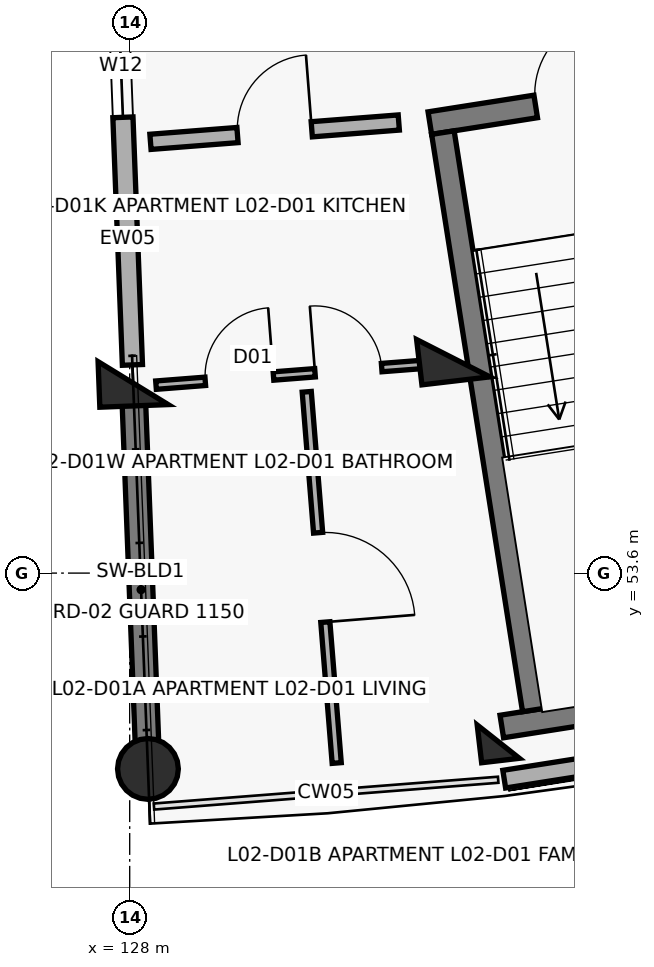
"""IFC4 building model, lengths in metres.
Left out: names, types, materials, properties, quantities, classifications, styles, units other than length and angle.
Written with IfcOpenShell. Run it as: python <this file> out.ifc"""

import sys

from ifc_helpers import new_model, si_unit, direction, frame, frame_2d, origin, origin_2d, place, context, subcontext, project, spatial, rectangle, circle, extrude, element, fill, save


model = new_model("IFC4")
c1 = context("Model", 3, precision=1e-05, world=origin(), true_north=direction((0.0, 1.0)))
c2 = subcontext(c1, "Body", "Model", "MODEL_VIEW")
j1 = project(units=[si_unit("LENGTHUNIT", "METRE"), si_unit("PLANEANGLEUNIT", "RADIAN")], contexts=[c1])
p1 = place(None, origin())
s1 = spatial("IfcSite", under=j1, at=p1, CompositionType="ELEMENT")
p2 = place(p1, origin())
s2 = spatial("IfcBuilding", under=s1, at=p2, CompositionType="ELEMENT")
p3 = place(p2, frame((0.0, 0.0, 8.1)))
s3 = spatial("IfcBuildingStorey", under=s2, at=p3, CompositionType="ELEMENT", Elevation=8.1)
p4 = place(p3, frame((128.045, 56.1, 0.0), z_axis=(0.0, 0.0, 1.0), x_axis=(0.038387809088, -0.999262916411, 0.0)))
e1 = element("IfcColumn", 1, at=p4, inside=s3, PredefinedType="COLUMN", context=c2, shape_type="SweptSolid", body=[
    extrude(rectangle(XDim=0.6, YDim=0.9, at=origin_2d()), origin(), (0.0, 0.0, 1.0), 3.1),
])
p5 = place(p3, frame((128.24, 51.023, 0.0), z_axis=(0.0, 0.0, 1.0), x_axis=(0.038387809088, -0.999262916411, 0.0)))
e2 = element("IfcColumn", 2, at=p5, inside=s3, PredefinedType="COLUMN", context=c2, shape_type="SweptSolid", body=[
    extrude(circle(Radius=0.4, at=origin_2d()), origin(), (0.0, 0.0, 1.0), 3.1),
])
p6 = place(p3, frame((132.257, 56.427, 0.0), z_axis=(0.0, 0.0, 1.0), x_axis=(0.116670737099, -0.993170649538, 0.0)))
e3 = element("IfcColumn", 3, at=p6, inside=s3, PredefinedType="COLUMN", context=c2, shape_type="SweptSolid", body=[
    extrude(rectangle(XDim=0.6, YDim=0.9, at=origin_2d()), origin(), (0.0, 0.0, 1.0), 3.1),
])
p7 = place(p3, frame((132.85, 51.382, 0.0), z_axis=(0.0, 0.0, 1.0), x_axis=(0.116670737099, -0.993170649538, 0.0)))
e4 = element("IfcColumn", 4, at=p7, inside=s3, PredefinedType="COLUMN", context=c2, shape_type="SweptSolid", body=[
    extrude(rectangle(XDim=0.5, YDim=0.5, at=origin_2d()), origin(), (0.0, 0.0, 1.0), 3.1),
])
p8 = place(p3, frame((128.052, 55.92, 0.0), z_axis=(0.0, 0.0, 1.0), x_axis=(0.038381471406, -0.99926315986, 0.0)))
e5 = element("IfcWall", 5, at=p8, inside=s3, PredefinedType="SHEAR", context=c2, shape_type="SweptSolid", body=[
    extrude(rectangle(XDim=4.72, YDim=0.31, at=frame_2d((2.36, 0.0))), origin(), (0.0, 0.0, 1.0), 2.86),
])
p9 = place(p3, frame((132.928, 50.889, 0.0), z_axis=(0.0, 0.0, 1.0), x_axis=(0.987828826394, 0.155544880165, 0.0)))
e6 = element("IfcWall", 6, at=p9, inside=s3, PredefinedType="SOLIDWALL", context=c2, shape_type="SweptSolid", body=[
    extrude(rectangle(XDim=4.622, YDim=0.235, at=frame_2d((2.311, 0.0))), origin(), (0.0, 0.0, 1.0), 2.25),
])
p10 = place(p3, frame((127.721, 64.533, 0.0), z_axis=(0.0, 0.0, 1.0), x_axis=(0.038407966241, -0.999262141847, 0.0)))
e7 = element("IfcWall", 7, at=p10, inside=s3, PredefinedType="SOLIDWALL", context=c2, shape_type="SweptSolid", body=[
    extrude(rectangle(XDim=8.2, YDim=0.265, at=frame_2d((4.1, 0.0))), origin(), (0.0, 0.0, 1.0), 2.08),
])
p11 = place(p10, frame((3.59, 0.0, 0.75)))
e8 = element("IfcOpeningElement", 8, at=p11, cuts=e7, PredefinedType="OPENING", context=c2, shape_type="SweptSolid", body=[
    extrude(rectangle(XDim=1.35, YDim=1.35, at=frame_2d((0.675, 0.675))), frame((0.0, 0.142, 0.0), z_axis=(0.0, -1.0, 0.0), x_axis=(1.0, 0.0, 0.0)), (0.0, 0.0, 1.0), 0.285),
])
p12 = place(p3, frame((131.949, 59.521, 0.0), z_axis=(0.0, 0.0, 1.0), x_axis=(0.98782579805, 0.155564111245, 0.0)))
e9 = element("IfcWall", 9, at=p12, inside=s3, PredefinedType="SHEAR", context=c2, shape_type="SweptSolid", body=[
    extrude(rectangle(XDim=3.87, YDim=0.3, at=frame_2d((1.935, 0.0))), origin(), (0.0, 0.0, 1.0), 3.1),
])
p13 = place(p12, frame((1.41, 0.0, 0.0)))
e10 = element("IfcOpeningElement", 10, at=p13, cuts=e9, PredefinedType="OPENING", context=c2, shape_type="SweptSolid", body=[
    extrude(rectangle(XDim=1.05, YDim=2.15, at=frame_2d((0.525, 1.075))), frame((0.0, 0.16, 0.0), z_axis=(0.0, -1.0, 0.0), x_axis=(1.0, 0.0, 0.0)), (0.0, 0.0, 1.0), 0.32),
])
p14 = place(p3, frame((132.896, 51.581, 0.0), z_axis=(0.0, 0.0, 1.0), x_axis=(0.987819142769, 0.155606366126, 0.0)))
e11 = element("IfcWall", 11, at=p14, inside=s3, PredefinedType="SHEAR", context=c2, shape_type="SweptSolid", body=[
    extrude(rectangle(XDim=4.47, YDim=0.3, at=frame_2d((2.235, 0.0))), origin(), (0.0, 0.0, 1.0), 3.1),
])
p15 = place(p3, frame((132.121, 59.396, 0.0), z_axis=(0.0, 0.0, 1.0), x_axis=(0.155563141844, -0.987825950712, 0.0)))
e12 = element("IfcWall", 12, at=p15, inside=s3, PredefinedType="SHEAR", context=c2, shape_type="SweptSolid", body=[
    extrude(rectangle(XDim=7.69, YDim=0.3, at=frame_2d((3.845, 0.0))), origin(), (0.0, 0.0, 1.0), 3.1),
])
p16 = place(p3, frame((128.273, 59.274, 0.0), z_axis=(0.0, 0.0, 1.0), x_axis=(0.996982624396, 0.077625038827, 0.0)))
e13 = element("IfcWall", 13, at=p16, inside=s3, PredefinedType="SOLIDWALL", context=c2, shape_type="SweptSolid", body=[
    extrude(rectangle(XDim=3.277, YDim=0.2, at=frame_2d((1.639, 0.0))), origin(), (0.0, 0.0, 1.0), 2.08),
])
p17 = place(p16, frame((1.148, 0.0, 0.0)))
e14 = element("IfcOpeningElement", 14, at=p17, cuts=e13, PredefinedType="OPENING", context=c2, shape_type="SweptSolid", body=[
    extrude(rectangle(XDim=0.98, YDim=2.15, at=frame_2d((0.49, 1.075))), frame((0.0, 0.11, 0.0), z_axis=(0.0, -1.0, 0.0), x_axis=(1.0, 0.0, 0.0)), (0.0, 0.0, 1.0), 0.22),
])
p18 = place(p3, frame((128.346, 56.073, 0.0), z_axis=(0.0, 0.0, 1.0), x_axis=(0.996986014478, 0.077581485773, 0.0)))
e15 = element("IfcWall", 15, at=p18, inside=s3, PredefinedType="PARTITIONING", context=c2, shape_type="SweptSolid", body=[
    extrude(rectangle(XDim=3.628, YDim=0.11, at=frame_2d((1.814, 0.0))), origin(), (0.0, 0.0, 1.0), 2.08),
])
p19 = place(p18, frame((0.65, 0.0, 0.0)))
e16 = element("IfcOpeningElement", 16, at=p19, cuts=e15, PredefinedType="OPENING", context=c2, shape_type="SweptSolid", body=[
    extrude(rectangle(XDim=0.9, YDim=2.1, at=frame_2d((0.45, 1.05))), frame((0.0, 0.065, 0.0), z_axis=(0.0, -1.0, 0.0), x_axis=(1.0, 0.0, 0.0)), (0.0, 0.0, 1.0), 0.13),
])
p20 = place(p18, frame((2.098, 0.0, 0.0)))
e17 = element("IfcOpeningElement", 17, at=p20, cuts=e15, PredefinedType="OPENING", context=c2, shape_type="SweptSolid", body=[
    extrude(rectangle(XDim=0.88, YDim=2.1, at=frame_2d((0.44, 1.05))), frame((0.0, 0.065, 0.0), z_axis=(0.0, -1.0, 0.0), x_axis=(1.0, 0.0, 0.0)), (0.0, 0.0, 1.0), 0.13),
])
p21 = place(p3, frame((130.329, 55.985, 0.0), z_axis=(0.0, 0.0, 1.0), x_axis=(0.080464029972, -0.99675751308, 0.0)))
e18 = element("IfcWall", 18, at=p21, inside=s3, PredefinedType="PARTITIONING", context=c2, shape_type="SweptSolid", body=[
    extrude(rectangle(XDim=4.9, YDim=0.12, at=frame_2d((2.45, 0.0))), origin(), (0.0, 0.0, 1.0), 2.08),
])
p22 = place(p21, frame((1.86, 0.0, 0.0)))
e19 = element("IfcOpeningElement", 19, at=p22, cuts=e18, PredefinedType="OPENING", context=c2, shape_type="SweptSolid", body=[
    extrude(rectangle(XDim=1.18, YDim=2.1, at=frame_2d((0.59, 1.05))), frame((0.0, 0.07, 0.0), z_axis=(0.0, -1.0, 0.0), x_axis=(1.0, 0.0, 0.0)), (0.0, 0.0, 1.0), 0.14),
])
p23 = place(p11, origin())
e20 = element("IfcWindow", 20, at=p23, inside=s3, PartitioningType="DOUBLE_PANEL_VERTICAL", PredefinedType="WINDOW", context=c2, shape_type="SweptSolid", body=[
    extrude(rectangle(XDim=1.35, YDim=1.35, at=frame_2d((0.675, 0.675))), frame((0.0, 0.03, 0.0), z_axis=(0.0, -1.0, 0.0), x_axis=(1.0, 0.0, 0.0)), (0.0, 0.0, 1.0), 0.06),
])
fill(e8, e20)
p24 = place(p13, origin())
e21 = element("IfcDoor", 21, at=p24, inside=s3, OperationType="SINGLE_SWING_RIGHT", PredefinedType="DOOR", context=c2, shape_type="SweptSolid", body=[
    extrude(rectangle(XDim=1.05, YDim=2.15, at=frame_2d((0.525, 1.075))), frame((0.0, 0.025, 0.0), z_axis=(0.0, -1.0, 0.0), x_axis=(1.0, 0.0, 0.0)), (0.0, 0.0, 1.0), 0.05),
])
fill(e10, e21)
p25 = place(p17, origin())
e22 = element("IfcDoor", 22, at=p25, inside=s3, OperationType="SINGLE_SWING_RIGHT", PredefinedType="DOOR", context=c2, shape_type="SweptSolid", body=[
    extrude(rectangle(XDim=0.98, YDim=2.15, at=frame_2d((0.49, 1.075))), frame((0.0, 0.025, 0.0), z_axis=(0.0, -1.0, 0.0), x_axis=(1.0, 0.0, 0.0)), (0.0, 0.0, 1.0), 0.05),
])
fill(e14, e22)
p26 = place(p19, origin())
e23 = element("IfcDoor", 23, at=p26, inside=s3, OperationType="SINGLE_SWING_RIGHT", PredefinedType="DOOR", context=c2, shape_type="SweptSolid", body=[
    extrude(rectangle(XDim=0.9, YDim=2.1, at=frame_2d((0.45, 1.05))), frame((0.0, 0.025, 0.0), z_axis=(0.0, -1.0, 0.0), x_axis=(1.0, 0.0, 0.0)), (0.0, 0.0, 1.0), 0.05),
])
fill(e16, e23)
p27 = place(p20, origin())
e24 = element("IfcDoor", 24, at=p27, inside=s3, OperationType="SINGLE_SWING_LEFT", PredefinedType="DOOR", context=c2, shape_type="SweptSolid", body=[
    extrude(rectangle(XDim=0.88, YDim=2.1, at=frame_2d((0.44, 1.05))), frame((0.0, 0.025, 0.0), z_axis=(0.0, -1.0, 0.0), x_axis=(1.0, 0.0, 0.0)), (0.0, 0.0, 1.0), 0.05),
])
fill(e17, e24)
p28 = place(p22, origin())
e25 = element("IfcDoor", 25, at=p28, inside=s3, OperationType="SINGLE_SWING_RIGHT", PredefinedType="DOOR", context=c2, shape_type="SweptSolid", body=[
    extrude(rectangle(XDim=1.18, YDim=2.1, at=frame_2d((0.59, 1.05))), frame((0.0, 0.025, 0.0), z_axis=(0.0, -1.0, 0.0), x_axis=(1.0, 0.0, 0.0)), (0.0, 0.0, 1.0), 0.05),
])
fill(e19, e25)
save(model, sys.argv[1])
